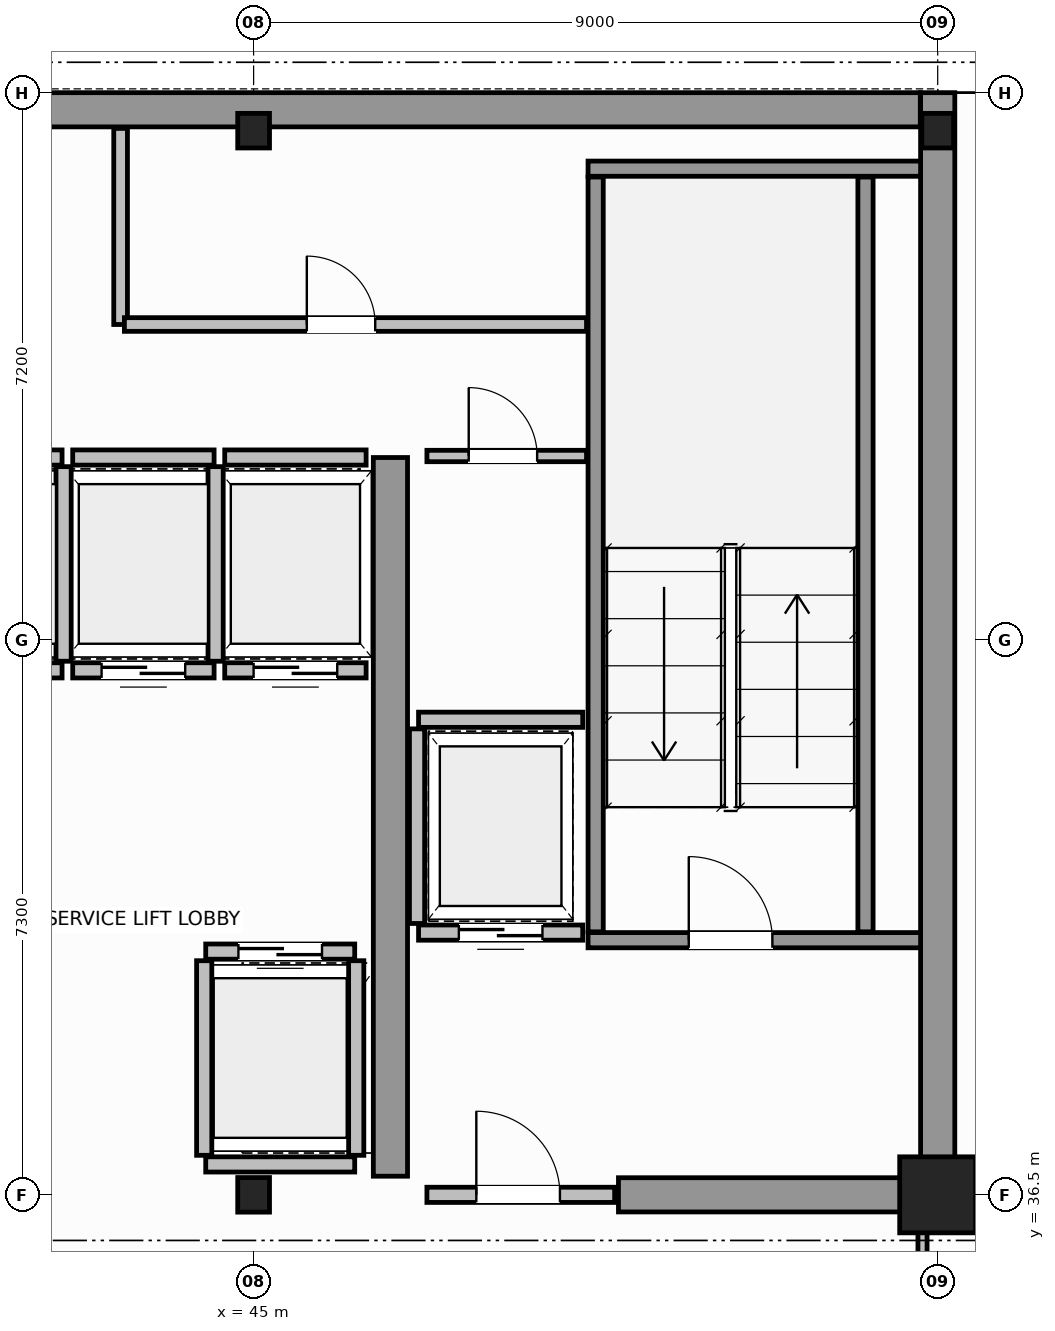
"""IFC4 building model, lengths in metres.
Left out: names, types, materials, properties, quantities, classifications, styles, units other than length and angle.
Written with IfcOpenShell. Run it as: python <this file> out.ifc"""

import sys

from ifc_helpers import new_model, si_unit, direction, frame, frame_2d, origin, origin_2d, place, context, subcontext, project, spatial, rectangle, i_section, extrude, source, transform, mapped, element, fill, save


model = new_model("IFC4")
c1 = context("Model", 3, precision=1e-05, world=origin(), true_north=direction((0.0, 1.0)))
c2 = subcontext(c1, "Body", "Model", "MODEL_VIEW")
j1 = project(units=[si_unit("LENGTHUNIT", "METRE"), si_unit("PLANEANGLEUNIT", "RADIAN")], contexts=[c1])
p1 = place(None, origin())
s1 = spatial("IfcSite", under=j1, at=p1, CompositionType="ELEMENT")
p2 = place(p1, origin())
s2 = spatial("IfcBuilding", under=s1, at=p2, CompositionType="ELEMENT")
p3 = place(p2, frame((0.0, 0.0, 261.2)))
s3 = spatial("IfcBuildingStorey", under=s2, at=p3, CompositionType="ELEMENT", Elevation=261.2)
m1 = source(origin(), c2, "Body", "SweptSolid", [
    extrude(i_section(OverallWidth=0.418, OverallDepth=0.455, WebThickness=0.042, FlangeThickness=0.058, FilletRadius=0.015, at=origin_2d()), origin(), (0.0, 0.0, 1.0), 3.8),
])
p4 = place(p3, frame((45.0, 36.5, 0.0), z_axis=(0.0, 0.0, 1.0), x_axis=(1.0, 0.0, 0.0)))
e1 = element("IfcColumn", 1, at=p4, inside=s3, PredefinedType="COLUMN", context=c2, shape_type="MappedRepresentation", body=[
    mapped(m1, transform((0.0, 0.0, 0.0), scale=1.0)),
])
m2 = source(origin(), c2, "Body", "SweptSolid", [
    extrude(rectangle(XDim=1.0, YDim=1.0, at=origin_2d()), origin(), (0.0, 0.0, 1.0), 3.8),
])
p5 = place(p3, frame((54.0, 36.5, 0.0), z_axis=(0.0, 0.0, 1.0), x_axis=(1.0, 0.0, 0.0)))
e2 = element("IfcColumn", 2, at=p5, inside=s3, PredefinedType="COLUMN", context=c2, shape_type="MappedRepresentation", body=[
    mapped(m2, transform((0.0, 0.0, 0.0), scale=1.0)),
])
for number, where, z_axis, x_axis in (
    (3, (45.0, 50.5, 0.0), (0.0, 0.0, 1.0), (1.0, 0.0, 0.0)),
    (4, (54.0, 50.5, 0.0), (0.0, 0.0, 1.0), (1.0, 0.0, 0.0)),
):
    element("IfcColumn", number, at=place(p3, frame(where, z_axis=z_axis, x_axis=x_axis)), inside=s3, PredefinedType="COLUMN", context=c2, shape_type="MappedRepresentation", body=[
        mapped(m1, transform((0.0, 0.0, 0.0), scale=1.0)),
    ])
p6 = place(p3, frame((34.002, 50.775, 0.0), z_axis=(0.0, 0.0, 1.0), x_axis=(1.0, 0.0, 0.0)))
e5 = element("IfcWall", 5, at=p6, inside=s3, PredefinedType="SHEAR", context=c2, shape_type="SweptSolid", body=[
    extrude(rectangle(XDim=19.769, YDim=0.45, at=frame_2d((9.885, 0.0))), origin(), (0.0, 0.0, 1.0), 3.8),
])
p7 = place(p3, frame((54.0, 36.5, 0.0), z_axis=(0.0, 0.0, 1.0), x_axis=(0.0, 1.0, 0.0)))
e6 = element("IfcWall", 6, at=p7, inside=s3, PredefinedType="SHEAR", context=c2, shape_type="SweptSolid", body=[
    extrude(rectangle(XDim=14.5, YDim=0.45, at=frame_2d((7.25, 0.0))), origin(), (0.0, 0.0, 1.0), 3.8),
])
p8 = place(p3, frame((49.8, 36.5, 0.0), z_axis=(0.0, 0.0, 1.0), x_axis=(1.0, 0.0, 0.0)))
e7 = element("IfcWall", 7, at=p8, inside=s3, PredefinedType="SHEAR", context=c2, shape_type="SweptSolid", body=[
    extrude(rectangle(XDim=3.955, YDim=0.45, at=frame_2d((1.978, 0.0))), origin(), (0.0, 0.0, 1.0), 2.58),
])
p9 = place(p3, frame((46.8, 36.745, 0.0), z_axis=(0.0, 0.0, 1.0), x_axis=(0.0, 1.0, 0.0)))
e8 = element("IfcWall", 8, at=p9, inside=s3, PredefinedType="SHEAR", context=c2, shape_type="SweptSolid", body=[
    extrude(rectangle(XDim=9.455, YDim=0.45, at=frame_2d((4.728, 0.0))), origin(), (0.0, 0.0, 1.0), 3.8),
])
p10 = place(p3, frame((49.4, 39.85, 0.0), z_axis=(0.0, 0.0, 1.0), x_axis=(1.0, 0.0, 0.0)))
e9 = element("IfcWall", 9, at=p10, inside=s3, PredefinedType="SOLIDWALL", context=c2, shape_type="SweptSolid", body=[
    extrude(rectangle(XDim=4.375, YDim=0.2, at=frame_2d((2.188, 0.0))), origin(), (0.0, 0.0, 1.0), 3.8),
])
p11 = place(p10, frame((1.325, 0.0, 0.0)))
e10 = element("IfcOpeningElement", 10, at=p11, cuts=e9, PredefinedType="OPENING", context=c2, shape_type="SweptSolid", body=[
    extrude(rectangle(XDim=1.1, YDim=2.15, at=frame_2d((0.55, 1.075))), frame((0.0, 0.11, 0.0), z_axis=(0.0, -1.0, 0.0), x_axis=(1.0, 0.0, 0.0)), (0.0, 0.0, 1.0), 0.22),
])
p12 = place(p3, frame((49.4, 50.0, 0.0), z_axis=(0.0, 0.0, 1.0), x_axis=(1.0, 0.0, 0.0)))
e11 = element("IfcWall", 11, at=p12, inside=s3, PredefinedType="SOLIDWALL", context=c2, shape_type="SweptSolid", body=[
    extrude(rectangle(XDim=4.375, YDim=0.2, at=frame_2d((2.188, 0.0))), origin(), (0.0, 0.0, 1.0), 3.8),
])
for number, where, z_axis, x_axis in (
    (12, (49.5, 39.96, 0.0), (0.0, 0.0, 1.0), (0.0, 1.0, 0.0)),
    (13, (53.05, 39.96, 0.0), (0.0, 0.0, 1.0), (0.0, 1.0, 0.0)),
):
    element("IfcWall", number, at=place(p3, frame(where, z_axis=z_axis, x_axis=x_axis)), inside=s3, PredefinedType="SOLIDWALL", context=c2, shape_type="SweptSolid", body=[
        extrude(rectangle(XDim=9.93, YDim=0.2, at=frame_2d((4.965, 0.0))), origin(), (0.0, 0.0, 1.0), 3.8),
    ])
p13 = place(p3, frame((47.28, 36.5, 0.0), z_axis=(0.0, 0.0, 1.0), x_axis=(1.0, 0.0, 0.0)))
e14 = element("IfcWall", 14, at=p13, inside=s3, PredefinedType="SOLIDWALL", context=c2, shape_type="SweptSolid", body=[
    extrude(rectangle(XDim=2.47, YDim=0.2, at=frame_2d((1.235, 0.0))), origin(), (0.0, 0.0, 1.0), 2.57),
])
p14 = place(p13, frame((0.65, 0.0, 0.0)))
e15 = element("IfcOpeningElement", 15, at=p14, cuts=e14, PredefinedType="OPENING", context=c2, shape_type="SweptSolid", body=[
    extrude(rectangle(XDim=1.1, YDim=2.15, at=frame_2d((0.55, 1.075))), frame((0.0, 0.11, 0.0), z_axis=(0.0, -1.0, 0.0), x_axis=(1.0, 0.0, 0.0)), (0.0, 0.0, 1.0), 0.22),
])
p15 = place(p3, frame((44.37, 39.7, 0.0), z_axis=(0.0, 0.0, 1.0), x_axis=(1.0, 0.0, 0.0)))
e16 = element("IfcWall", 16, at=p15, inside=s3, PredefinedType="SOLIDWALL", context=c2, shape_type="SweptSolid", body=[
    extrude(rectangle(XDim=1.96, YDim=0.2, at=frame_2d((0.98, 0.0))), origin(), (0.0, 0.0, 1.0), 3.58),
])
p16 = place(p15, frame((0.43, 0.0, 0.0)))
e17 = element("IfcOpeningElement", 17, at=p16, cuts=e16, PredefinedType="OPENING", context=c2, shape_type="SweptSolid", body=[
    extrude(rectangle(XDim=1.1, YDim=2.15, at=frame_2d((0.55, 1.075))), frame((0.0, 0.11, 0.0), z_axis=(0.0, -1.0, 0.0), x_axis=(1.0, 0.0, 0.0)), (0.0, 0.0, 1.0), 0.22),
])
p17 = place(p3, frame((44.37, 36.9, 0.0), z_axis=(0.0, 0.0, 1.0), x_axis=(1.0, 0.0, 0.0)))
e18 = element("IfcWall", 18, at=p17, inside=s3, PredefinedType="SOLIDWALL", context=c2, shape_type="SweptSolid", body=[
    extrude(rectangle(XDim=1.96, YDim=0.2, at=frame_2d((0.98, 0.0))), origin(), (0.0, 0.0, 1.0), 2.57),
])
for number, where, z_axis, x_axis in (
    (19, (44.35, 37.02, 0.0), (0.0, 0.0, 1.0), (0.0, 1.0, 0.0)),
    (20, (46.35, 37.02, 0.0), (0.0, 0.0, 1.0), (0.0, 1.0, 0.0)),
):
    element("IfcWall", number, at=place(p3, frame(where, z_axis=z_axis, x_axis=x_axis)), inside=s3, PredefinedType="SOLIDWALL", context=c2, shape_type="SweptSolid", body=[
        extrude(rectangle(XDim=2.56, YDim=0.2, at=frame_2d((1.28, 0.0))), origin(), (0.0, 0.0, 1.0), 3.58),
    ])
p18 = place(p3, frame((40.62, 43.4, 0.0), z_axis=(0.0, 0.0, 1.0), x_axis=(1.0, 0.0, 0.0)))
e21 = element("IfcWall", 21, at=p18, inside=s3, PredefinedType="SOLIDWALL", context=c2, shape_type="SweptSolid", body=[
    extrude(rectangle(XDim=1.86, YDim=0.2, at=frame_2d((0.93, 0.0))), origin(), (0.0, 0.0, 1.0), 3.58),
])
p19 = place(p18, frame((0.38, 0.0, 0.0)))
e22 = element("IfcOpeningElement", 22, at=p19, cuts=e21, PredefinedType="OPENING", context=c2, shape_type="SweptSolid", body=[
    extrude(rectangle(XDim=1.1, YDim=2.15, at=frame_2d((0.55, 1.075))), frame((0.0, 0.11, 0.0), z_axis=(0.0, -1.0, 0.0), x_axis=(1.0, 0.0, 0.0)), (0.0, 0.0, 1.0), 0.22),
])
p20 = place(p3, frame((40.62, 46.2, 0.0), z_axis=(0.0, 0.0, 1.0), x_axis=(1.0, 0.0, 0.0)))
e23 = element("IfcWall", 23, at=p20, inside=s3, PredefinedType="SOLIDWALL", context=c2, shape_type="SweptSolid", body=[
    extrude(rectangle(XDim=1.86, YDim=0.2, at=frame_2d((0.93, 0.0))), origin(), (0.0, 0.0, 1.0), 3.58),
])
p21 = place(p3, frame((42.5, 43.52, 0.0), z_axis=(0.0, 0.0, 1.0), x_axis=(0.0, 1.0, 0.0)))
e24 = element("IfcWall", 24, at=p21, inside=s3, PredefinedType="SOLIDWALL", context=c2, shape_type="SweptSolid", body=[
    extrude(rectangle(XDim=2.56, YDim=0.2, at=frame_2d((1.28, 0.0))), origin(), (0.0, 0.0, 1.0), 3.58),
])
p22 = place(p3, frame((42.62, 43.4, 0.0), z_axis=(0.0, 0.0, 1.0), x_axis=(1.0, 0.0, 0.0)))
e25 = element("IfcWall", 25, at=p22, inside=s3, PredefinedType="SOLIDWALL", context=c2, shape_type="SweptSolid", body=[
    extrude(rectangle(XDim=1.86, YDim=0.2, at=frame_2d((0.93, 0.0))), origin(), (0.0, 0.0, 1.0), 3.58),
])
p23 = place(p22, frame((0.38, 0.0, 0.0)))
e26 = element("IfcOpeningElement", 26, at=p23, cuts=e25, PredefinedType="OPENING", context=c2, shape_type="SweptSolid", body=[
    extrude(rectangle(XDim=1.1, YDim=2.15, at=frame_2d((0.55, 1.075))), frame((0.0, 0.11, 0.0), z_axis=(0.0, -1.0, 0.0), x_axis=(1.0, 0.0, 0.0)), (0.0, 0.0, 1.0), 0.22),
])
p24 = place(p3, frame((42.62, 46.2, 0.0), z_axis=(0.0, 0.0, 1.0), x_axis=(1.0, 0.0, 0.0)))
e27 = element("IfcWall", 27, at=p24, inside=s3, PredefinedType="SOLIDWALL", context=c2, shape_type="SweptSolid", body=[
    extrude(rectangle(XDim=1.86, YDim=0.2, at=frame_2d((0.93, 0.0))), origin(), (0.0, 0.0, 1.0), 3.58),
])
p25 = place(p3, frame((44.5, 43.52, 0.0), z_axis=(0.0, 0.0, 1.0), x_axis=(0.0, 1.0, 0.0)))
e28 = element("IfcWall", 28, at=p25, inside=s3, PredefinedType="SOLIDWALL", context=c2, shape_type="SweptSolid", body=[
    extrude(rectangle(XDim=2.56, YDim=0.2, at=frame_2d((1.28, 0.0))), origin(), (0.0, 0.0, 1.0), 3.58),
])
p26 = place(p3, frame((44.62, 43.4, 0.0), z_axis=(0.0, 0.0, 1.0), x_axis=(1.0, 0.0, 0.0)))
e29 = element("IfcWall", 29, at=p26, inside=s3, PredefinedType="SOLIDWALL", context=c2, shape_type="SweptSolid", body=[
    extrude(rectangle(XDim=1.86, YDim=0.2, at=frame_2d((0.93, 0.0))), origin(), (0.0, 0.0, 1.0), 3.58),
])
p27 = place(p26, frame((0.38, 0.0, 0.0)))
e30 = element("IfcOpeningElement", 30, at=p27, cuts=e29, PredefinedType="OPENING", context=c2, shape_type="SweptSolid", body=[
    extrude(rectangle(XDim=1.1, YDim=2.15, at=frame_2d((0.55, 1.075))), frame((0.0, 0.11, 0.0), z_axis=(0.0, -1.0, 0.0), x_axis=(1.0, 0.0, 0.0)), (0.0, 0.0, 1.0), 0.22),
])
p28 = place(p3, frame((44.62, 46.2, 0.0), z_axis=(0.0, 0.0, 1.0), x_axis=(1.0, 0.0, 0.0)))
e31 = element("IfcWall", 31, at=p28, inside=s3, PredefinedType="SOLIDWALL", context=c2, shape_type="SweptSolid", body=[
    extrude(rectangle(XDim=1.86, YDim=0.2, at=frame_2d((0.93, 0.0))), origin(), (0.0, 0.0, 1.0), 3.58),
])
p29 = place(p3, frame((47.17, 39.95, 0.0), z_axis=(0.0, 0.0, 1.0), x_axis=(1.0, 0.0, 0.0)))
e32 = element("IfcWall", 32, at=p29, inside=s3, PredefinedType="SOLIDWALL", context=c2, shape_type="SweptSolid", body=[
    extrude(rectangle(XDim=2.16, YDim=0.2, at=frame_2d((1.08, 0.0))), origin(), (0.0, 0.0, 1.0), 3.58),
])
p30 = place(p29, frame((0.53, 0.0, 0.0)))
e33 = element("IfcOpeningElement", 33, at=p30, cuts=e32, PredefinedType="OPENING", context=c2, shape_type="SweptSolid", body=[
    extrude(rectangle(XDim=1.1, YDim=2.15, at=frame_2d((0.55, 1.075))), frame((0.0, 0.11, 0.0), z_axis=(0.0, -1.0, 0.0), x_axis=(1.0, 0.0, 0.0)), (0.0, 0.0, 1.0), 0.22),
])
p31 = place(p3, frame((47.17, 42.75, 0.0), z_axis=(0.0, 0.0, 1.0), x_axis=(1.0, 0.0, 0.0)))
e34 = element("IfcWall", 34, at=p31, inside=s3, PredefinedType="SOLIDWALL", context=c2, shape_type="SweptSolid", body=[
    extrude(rectangle(XDim=2.16, YDim=0.2, at=frame_2d((1.08, 0.0))), origin(), (0.0, 0.0, 1.0), 3.58),
])
p32 = place(p3, frame((47.15, 40.07, 0.0), z_axis=(0.0, 0.0, 1.0), x_axis=(0.0, 1.0, 0.0)))
e35 = element("IfcWall", 35, at=p32, inside=s3, PredefinedType="SOLIDWALL", context=c2, shape_type="SweptSolid", body=[
    extrude(rectangle(XDim=2.56, YDim=0.2, at=frame_2d((1.28, 0.0))), origin(), (0.0, 0.0, 1.0), 3.58),
])
p33 = place(p3, frame((47.28, 46.22, 0.0), z_axis=(0.0, 0.0, 1.0), x_axis=(1.0, 0.0, 0.0)))
e36 = element("IfcWall", 36, at=p33, inside=s3, PredefinedType="PARTITIONING", context=c2, shape_type="SweptSolid", body=[
    extrude(rectangle(XDim=2.1, YDim=0.15, at=frame_2d((1.05, 0.0))), origin(), (0.0, 0.0, 1.0), 3.58),
])
p34 = place(p33, frame((0.55, 0.0, 0.0)))
e37 = element("IfcOpeningElement", 37, at=p34, cuts=e36, PredefinedType="OPENING", context=c2, shape_type="SweptSolid", body=[
    extrude(rectangle(XDim=0.9, YDim=2.1, at=frame_2d((0.45, 1.05))), frame((0.0, 0.085, 0.0), z_axis=(0.0, -1.0, 0.0), x_axis=(1.0, 0.0, 0.0)), (0.0, 0.0, 1.0), 0.17),
])
p35 = place(p3, frame((43.25, 47.95, 0.0), z_axis=(0.0, 0.0, 1.0), x_axis=(0.0, 1.0, 0.0)))
e38 = element("IfcWall", 38, at=p35, inside=s3, PredefinedType="PLUMBINGWALL", context=c2, shape_type="SweptSolid", body=[
    extrude(rectangle(XDim=2.58, YDim=0.18, at=frame_2d((1.29, 0.0))), origin(), (0.0, 0.0, 1.0), 3.58),
])
p36 = place(p3, frame((43.3, 47.95, 0.0), z_axis=(0.0, 0.0, 1.0), x_axis=(1.0, 0.0, 0.0)))
e39 = element("IfcWall", 39, at=p36, inside=s3, PredefinedType="PLUMBINGWALL", context=c2, shape_type="SweptSolid", body=[
    extrude(rectangle(XDim=6.08, YDim=0.18, at=frame_2d((3.04, 0.0))), origin(), (0.0, 0.0, 1.0), 3.58),
])
p37 = place(p36, frame((2.4, 0.0, 0.0)))
e40 = element("IfcOpeningElement", 40, at=p37, cuts=e39, PredefinedType="OPENING", context=c2, shape_type="SweptSolid", body=[
    extrude(rectangle(XDim=0.9, YDim=2.15, at=frame_2d((0.45, 1.075))), frame((0.0, 0.1, 0.0), z_axis=(0.0, -1.0, 0.0), x_axis=(1.0, 0.0, 0.0)), (0.0, 0.0, 1.0), 0.2),
])
p38 = place(p3, frame((53.8, 34.0, 0.0), z_axis=(0.0, 0.0, 1.0), x_axis=(0.0, 1.0, 0.0)))
e41 = element("IfcWall", 41, at=p38, inside=s3, PredefinedType="PARTITIONING", context=c2, shape_type="SweptSolid", body=[
    extrude(rectangle(XDim=2.44, YDim=0.12, at=frame_2d((1.22, 0.0))), origin(), (0.0, 0.0, 1.0), 3.58),
])
p39 = place(p38, frame((0.7, 0.0, 0.0)))
e42 = element("IfcOpeningElement", 42, at=p39, cuts=e41, PredefinedType="OPENING", context=c2, shape_type="SweptSolid", body=[
    extrude(rectangle(XDim=0.9, YDim=2.15, at=frame_2d((0.45, 1.075))), frame((0.0, 0.07, 0.0), z_axis=(0.0, -1.0, 0.0), x_axis=(1.0, 0.0, 0.0)), (0.0, 0.0, 1.0), 0.14),
])
m3 = source(origin(), c2, "Body", "SweptSolid", [
    extrude(rectangle(XDim=1.1, YDim=2.15, at=frame_2d((0.55, 1.075))), frame((0.0, 0.025, 0.0), z_axis=(0.0, -1.0, 0.0), x_axis=(1.0, 0.0, 0.0)), (0.0, 0.0, 1.0), 0.05),
])
p40 = place(p11, origin())
e43 = element("IfcDoor", 43, at=p40, inside=s3, OperationType="SINGLE_SWING_RIGHT", PredefinedType="DOOR", context=c2, shape_type="MappedRepresentation", body=[
    mapped(m3, transform((0.0, 0.0, 0.0), scale=1.0)),
])
fill(e10, e43)
p41 = place(p14, origin())
e44 = element("IfcDoor", 44, at=p41, inside=s3, OperationType="SINGLE_SWING_LEFT", PredefinedType="DOOR", context=c2, shape_type="MappedRepresentation", body=[
    mapped(m3, transform((0.0, 0.0, 0.0), scale=1.0)),
])
fill(e15, e44)
p42 = place(p16, origin())
e45 = element("IfcDoor", 45, at=p42, inside=s3, OperationType="DOUBLE_DOOR_SLIDING", PredefinedType="DOOR", context=c2, shape_type="MappedRepresentation", body=[
    mapped(m3, transform((0.0, 0.0, 0.0), scale=1.0)),
])
fill(e17, e45)
p43 = place(p23, origin())
e46 = element("IfcDoor", 46, at=p43, inside=s3, OperationType="DOUBLE_DOOR_SLIDING", PredefinedType="DOOR", context=c2, shape_type="MappedRepresentation", body=[
    mapped(m3, transform((0.0, 0.0, 0.0), scale=1.0)),
])
fill(e26, e46)
p44 = place(p27, origin())
e47 = element("IfcDoor", 47, at=p44, inside=s3, OperationType="DOUBLE_DOOR_SLIDING", PredefinedType="DOOR", context=c2, shape_type="MappedRepresentation", body=[
    mapped(m3, transform((0.0, 0.0, 0.0), scale=1.0)),
])
fill(e30, e47)
p45 = place(p30, origin())
e48 = element("IfcDoor", 48, at=p45, inside=s3, OperationType="DOUBLE_DOOR_SLIDING", PredefinedType="DOOR", context=c2, shape_type="MappedRepresentation", body=[
    mapped(m3, transform((0.0, 0.0, 0.0), scale=1.0)),
])
fill(e33, e48)
m4 = source(origin(), c2, "Body", "SweptSolid", [
    extrude(rectangle(XDim=0.9, YDim=2.1, at=frame_2d((0.45, 1.05))), frame((0.0, 0.025, 0.0), z_axis=(0.0, -1.0, 0.0), x_axis=(1.0, 0.0, 0.0)), (0.0, 0.0, 1.0), 0.05),
])
p46 = place(p34, origin())
e49 = element("IfcDoor", 49, at=p46, inside=s3, OperationType="SINGLE_SWING_RIGHT", PredefinedType="DOOR", context=c2, shape_type="MappedRepresentation", body=[
    mapped(m4, transform((0.0, 0.0, 0.0), scale=1.0)),
])
fill(e37, e49)
m5 = source(origin(), c2, "Body", "SweptSolid", [
    extrude(rectangle(XDim=0.9, YDim=2.15, at=frame_2d((0.45, 1.075))), frame((0.0, 0.025, 0.0), z_axis=(0.0, -1.0, 0.0), x_axis=(1.0, 0.0, 0.0)), (0.0, 0.0, 1.0), 0.05),
])
p47 = place(p37, origin())
e50 = element("IfcDoor", 50, at=p47, inside=s3, OperationType="SINGLE_SWING_RIGHT", PredefinedType="DOOR", context=c2, shape_type="MappedRepresentation", body=[
    mapped(m5, transform((0.0, 0.0, 0.0), scale=1.0)),
])
fill(e40, e50)
save(model, sys.argv[1])
